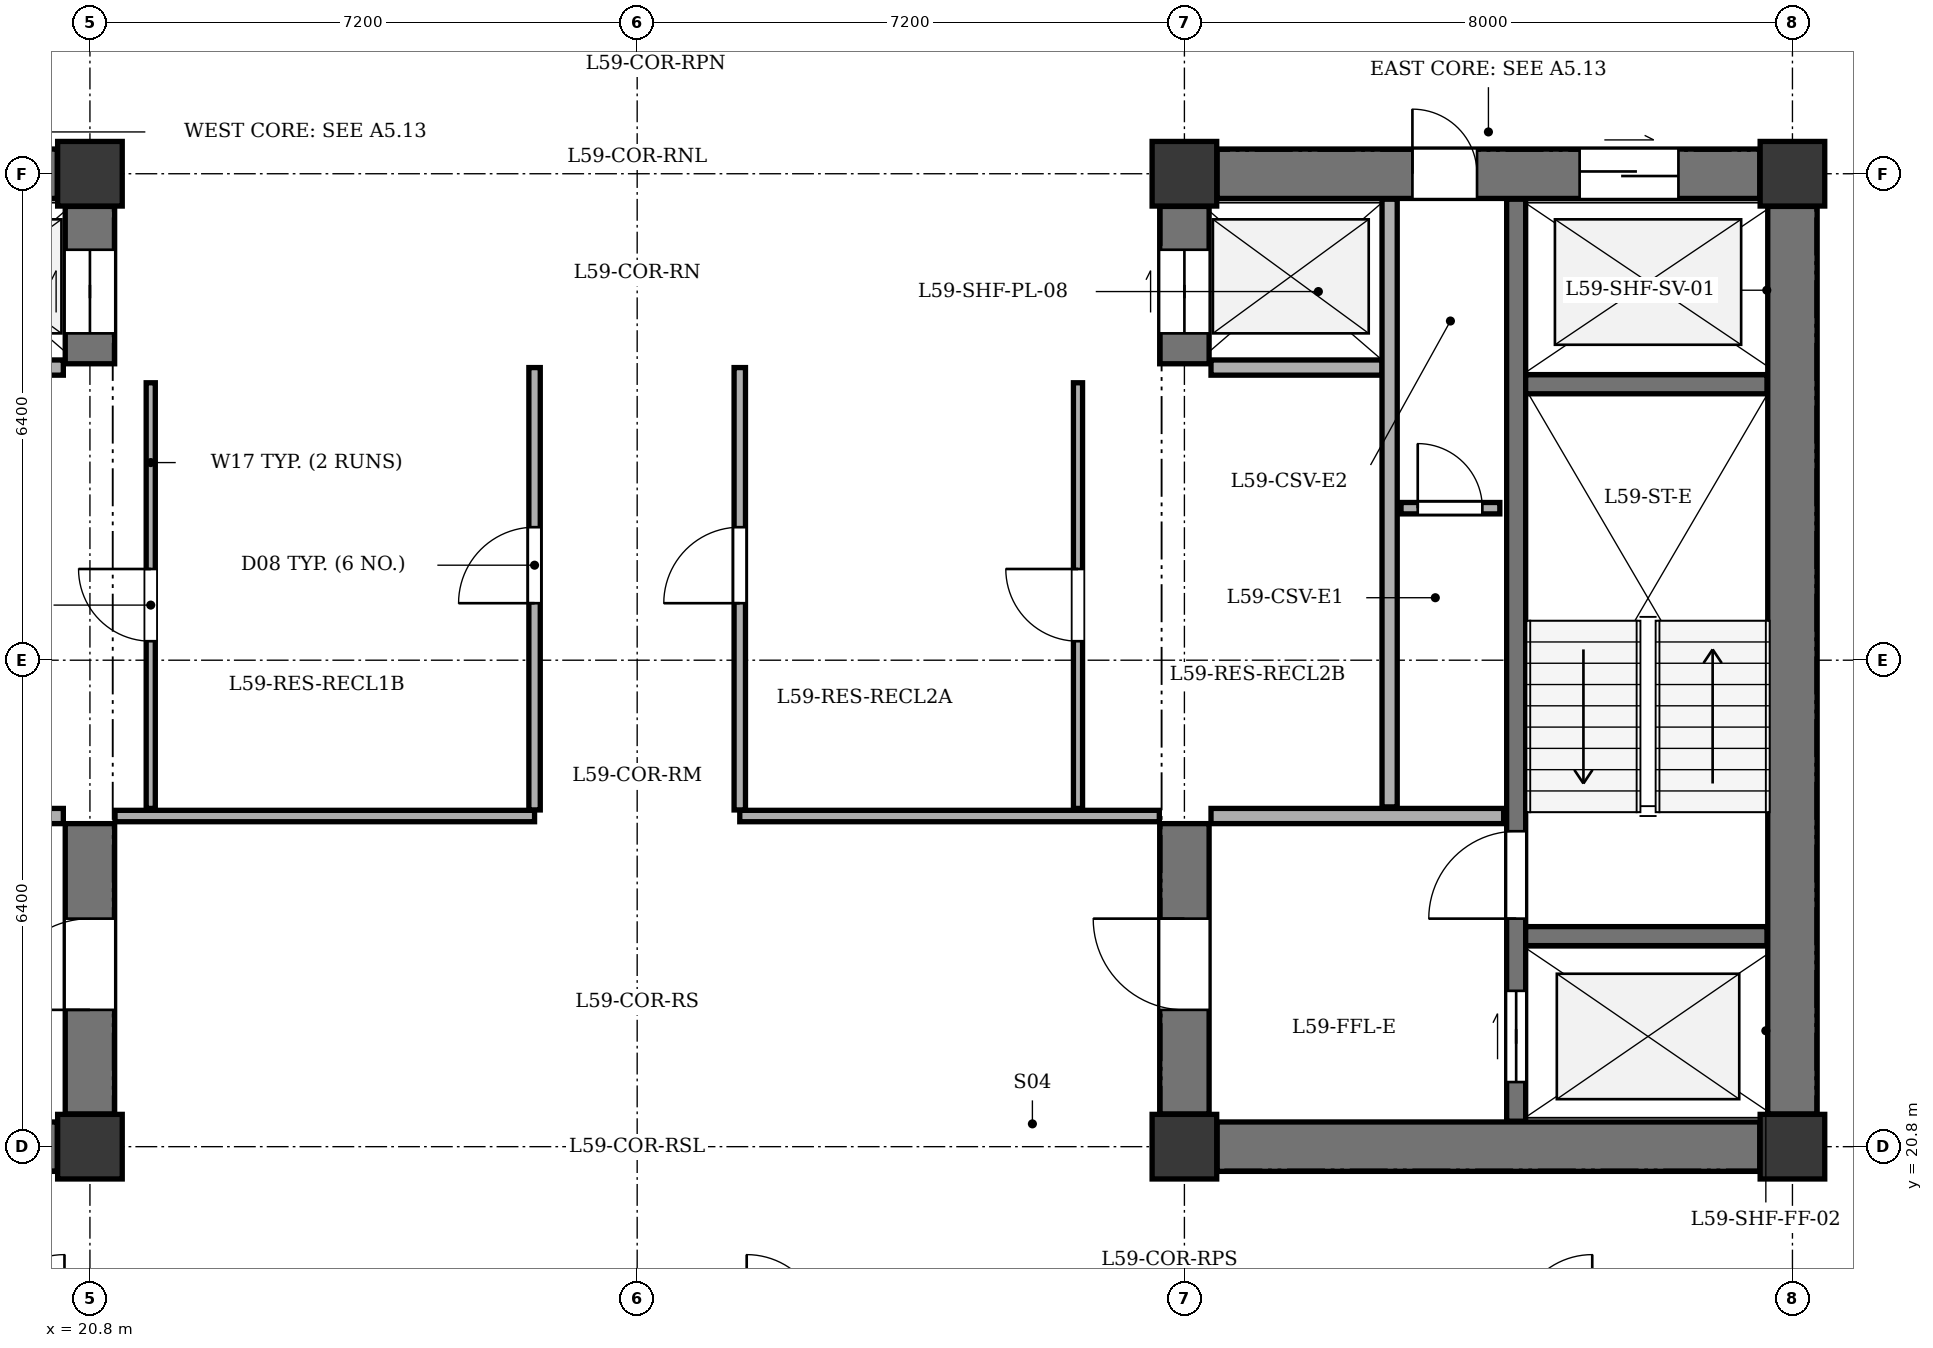
"""IFC4 building model, lengths in metres.
Left out: names, types, materials, properties, quantities, classifications, styles, units other than length and angle.
Written with IfcOpenShell. Run it as: python <this file> out.ifc"""

import sys

from ifc_helpers import new_model, si_unit, direction, frame, frame_2d, origin, origin_2d, place, context, subcontext, project, spatial, rectangle, extrude, element, fill, save


model = new_model("IFC4")
c1 = context("Model", 3, precision=1e-05, world=origin(), true_north=direction((0.0, 1.0)))
c2 = subcontext(c1, "Body", "Model", "MODEL_VIEW")
j1 = project(units=[si_unit("LENGTHUNIT", "METRE"), si_unit("PLANEANGLEUNIT", "RADIAN")], contexts=[c1])
p1 = place(None, origin())
s1 = spatial("IfcSite", under=j1, at=p1, CompositionType="ELEMENT")
p2 = place(p1, origin())
s2 = spatial("IfcBuilding", under=s1, at=p2, CompositionType="ELEMENT")
p3 = place(p2, frame((0.0, 0.0, 227.9)))
s3 = spatial("IfcBuildingStorey", under=s2, at=p3, CompositionType="ELEMENT", Elevation=227.9)
for number, where, z_axis, x_axis in (
    (1, (20.8, 20.8, 0.0), (0.0, 0.0, 1.0), (1.0, 0.0, 0.0)),
    (2, (20.8, 33.6, 0.0), (0.0, 0.0, 1.0), (1.0, 0.0, 0.0)),
    (3, (35.2, 20.8, 0.0), (0.0, 0.0, 1.0), (1.0, 0.0, 0.0)),
    (4, (43.2, 20.8, 0.0), (0.0, 0.0, 1.0), (1.0, 0.0, 0.0)),
    (5, (35.2, 33.6, 0.0), (0.0, 0.0, 1.0), (1.0, 0.0, 0.0)),
    (6, (43.2, 33.6, 0.0), (0.0, 0.0, 1.0), (1.0, 0.0, 0.0)),
):
    element("IfcColumn", number, at=place(p3, frame(where, z_axis=z_axis, x_axis=x_axis)), inside=s3, PredefinedType="COLUMN", context=c2, shape_type="SweptSolid", body=[
        extrude(rectangle(XDim=0.85, YDim=0.85, at=origin_2d()), origin(), (0.0, 0.0, 1.0), 3.4),
    ])
p4 = place(p3, frame((13.23, 20.8, 0.0), z_axis=(0.0, 0.0, 1.0), x_axis=(1.0, 0.0, 0.0)))
e7 = element("IfcWall", 7, at=p4, inside=s3, PredefinedType="SHEAR", context=c2, shape_type="SweptSolid", body=[
    extrude(rectangle(XDim=7.14, YDim=0.65, at=frame_2d((3.57, 0.0))), origin(), (0.0, 0.0, 1.0), 3.1),
])
p5 = place(p3, frame((13.23, 33.6, 0.0), z_axis=(0.0, 0.0, 1.0), x_axis=(1.0, 0.0, 0.0)))
e8 = element("IfcWall", 8, at=p5, inside=s3, PredefinedType="SHEAR", context=c2, shape_type="SweptSolid", body=[
    extrude(rectangle(XDim=7.14, YDim=0.65, at=frame_2d((3.57, 0.0))), origin(), (0.0, 0.0, 1.0), 3.1),
])
p6 = place(p5, frame((2.14, 0.0, 0.0)))
e9 = element("IfcOpeningElement", 9, at=p6, cuts=e8, PredefinedType="OPENING", context=c2, shape_type="SweptSolid", body=[
    extrude(rectangle(XDim=0.85, YDim=2.02, at=frame_2d((0.425, 1.01))), frame((0.0, 0.335, 0.0), z_axis=(0.0, -1.0, 0.0), x_axis=(1.0, 0.0, 0.0)), (0.0, 0.0, 1.0), 0.67),
])
p7 = place(p3, frame((20.8, 21.23, 0.0), z_axis=(0.0, 0.0, 1.0), x_axis=(0.0, 1.0, 0.0)))
e10 = element("IfcWall", 10, at=p7, inside=s3, PredefinedType="SHEAR", context=c2, shape_type="SweptSolid", body=[
    extrude(rectangle(XDim=3.82, YDim=0.65, at=frame_2d((1.91, 0.0))), origin(), (0.0, 0.0, 1.0), 3.1),
])
p8 = place(p7, frame((1.37, 0.0, 0.0)))
e11 = element("IfcOpeningElement", 11, at=p8, cuts=e10, PredefinedType="OPENING", context=c2, shape_type="SweptSolid", body=[
    extrude(rectangle(XDim=1.2, YDim=2.15, at=frame_2d((0.6, 1.075))), frame((0.0, 0.335, 0.0), z_axis=(0.0, -1.0, 0.0), x_axis=(1.0, 0.0, 0.0)), (0.0, 0.0, 1.0), 0.67),
])
p9 = place(p3, frame((20.8, 31.1, 0.0), z_axis=(0.0, 0.0, 1.0), x_axis=(0.0, 1.0, 0.0)))
e12 = element("IfcWall", 12, at=p9, inside=s3, PredefinedType="SHEAR", context=c2, shape_type="SweptSolid", body=[
    extrude(rectangle(XDim=2.07, YDim=0.65, at=frame_2d((1.035, 0.0))), origin(), (0.0, 0.0, 1.0), 3.1),
])
p10 = place(p9, frame((0.4, 0.0, 0.0)))
e13 = element("IfcOpeningElement", 13, at=p10, cuts=e12, PredefinedType="OPENING", context=c2, shape_type="SweptSolid", body=[
    extrude(rectangle(XDim=1.1, YDim=2.1, at=frame_2d((0.55, 1.05))), frame((0.0, 0.335, 0.0), z_axis=(0.0, -1.0, 0.0), x_axis=(1.0, 0.0, 0.0)), (0.0, 0.0, 1.0), 0.67),
])
for number, where, z_axis, x_axis in (
    (14, (16.6, 25.15, 0.0), (0.0, 0.0, 1.0), (1.0, 0.0, 0.0)),
    (15, (16.6, 31.05, 0.0), (0.0, 0.0, 1.0), (1.0, 0.0, 0.0)),
):
    element("IfcWall", number, at=place(p3, frame(where, z_axis=z_axis, x_axis=x_axis)), inside=s3, PredefinedType="SOLIDWALL", context=c2, shape_type="SweptSolid", body=[
        extrude(rectangle(XDim=3.85, YDim=0.2, at=frame_2d((1.925, 0.0))), origin(), (0.0, 0.0, 1.0), 3.1),
    ])
p11 = place(p3, frame((43.2, 21.23, 0.0), z_axis=(0.0, 0.0, 1.0), x_axis=(0.0, 1.0, 0.0)))
e16 = element("IfcWall", 16, at=p11, inside=s3, PredefinedType="SHEAR", context=c2, shape_type="SweptSolid", body=[
    extrude(rectangle(XDim=11.94, YDim=0.65, at=frame_2d((5.97, 0.0))), origin(), (0.0, 0.0, 1.0), 3.1),
])
p12 = place(p3, frame((35.63, 20.8, 0.0), z_axis=(0.0, 0.0, 1.0), x_axis=(1.0, 0.0, 0.0)))
e17 = element("IfcWall", 17, at=p12, inside=s3, PredefinedType="SHEAR", context=c2, shape_type="SweptSolid", body=[
    extrude(rectangle(XDim=7.14, YDim=0.65, at=frame_2d((3.57, 0.0))), origin(), (0.0, 0.0, 1.0), 3.1),
])
p13 = place(p3, frame((35.63, 33.6, 0.0), z_axis=(0.0, 0.0, 1.0), x_axis=(1.0, 0.0, 0.0)))
e18 = element("IfcWall", 18, at=p13, inside=s3, PredefinedType="SHEAR", context=c2, shape_type="SweptSolid", body=[
    extrude(rectangle(XDim=7.14, YDim=0.65, at=frame_2d((3.57, 0.0))), origin(), (0.0, 0.0, 1.0), 3.1),
])
p14 = place(p13, frame((4.77, 0.0, 0.0)))
e19 = element("IfcOpeningElement", 19, at=p14, cuts=e18, PredefinedType="OPENING", context=c2, shape_type="SweptSolid", body=[
    extrude(rectangle(XDim=1.3, YDim=2.15, at=frame_2d((0.65, 1.075))), frame((0.0, 0.335, 0.0), z_axis=(0.0, -1.0, 0.0), x_axis=(1.0, 0.0, 0.0)), (0.0, 0.0, 1.0), 0.67),
])
p15 = place(p13, frame((2.57, 0.0, 0.0)))
e20 = element("IfcOpeningElement", 20, at=p15, cuts=e18, PredefinedType="OPENING", context=c2, shape_type="SweptSolid", body=[
    extrude(rectangle(XDim=0.85, YDim=2.02, at=frame_2d((0.425, 1.01))), frame((0.0, 0.335, 0.0), z_axis=(0.0, -1.0, 0.0), x_axis=(1.0, 0.0, 0.0)), (0.0, 0.0, 1.0), 0.67),
])
p16 = place(p3, frame((35.2, 21.23, 0.0), z_axis=(0.0, 0.0, 1.0), x_axis=(0.0, 1.0, 0.0)))
e21 = element("IfcWall", 21, at=p16, inside=s3, PredefinedType="SHEAR", context=c2, shape_type="SweptSolid", body=[
    extrude(rectangle(XDim=3.82, YDim=0.65, at=frame_2d((1.91, 0.0))), origin(), (0.0, 0.0, 1.0), 3.1),
])
p17 = place(p16, frame((1.37, 0.0, 0.0)))
e22 = element("IfcOpeningElement", 22, at=p17, cuts=e21, PredefinedType="OPENING", context=c2, shape_type="SweptSolid", body=[
    extrude(rectangle(XDim=1.2, YDim=2.15, at=frame_2d((0.6, 1.075))), frame((0.0, 0.335, 0.0), z_axis=(0.0, -1.0, 0.0), x_axis=(1.0, 0.0, 0.0)), (0.0, 0.0, 1.0), 0.67),
])
p18 = place(p3, frame((35.2, 31.1, 0.0), z_axis=(0.0, 0.0, 1.0), x_axis=(0.0, 1.0, 0.0)))
e23 = element("IfcWall", 23, at=p18, inside=s3, PredefinedType="SHEAR", context=c2, shape_type="SweptSolid", body=[
    extrude(rectangle(XDim=2.07, YDim=0.65, at=frame_2d((1.035, 0.0))), origin(), (0.0, 0.0, 1.0), 3.1),
])
p19 = place(p18, frame((0.4, 0.0, 0.0)))
e24 = element("IfcOpeningElement", 24, at=p19, cuts=e23, PredefinedType="OPENING", context=c2, shape_type="SweptSolid", body=[
    extrude(rectangle(XDim=1.1, YDim=2.1, at=frame_2d((0.55, 1.05))), frame((0.0, 0.335, 0.0), z_axis=(0.0, -1.0, 0.0), x_axis=(1.0, 0.0, 0.0)), (0.0, 0.0, 1.0), 0.67),
])
p20 = place(p3, frame((39.565, 21.135, 0.0), z_axis=(0.0, 0.0, 1.0), x_axis=(0.0, 1.0, 0.0)))
e25 = element("IfcWall", 25, at=p20, inside=s3, PredefinedType="SHEAR", context=c2, shape_type="SweptSolid", body=[
    extrude(rectangle(XDim=12.13, YDim=0.25, at=frame_2d((6.065, 0.0))), origin(), (0.0, 0.0, 1.0), 3.1),
])
p21 = place(p20, frame((0.515, 0.0, 0.0)))
e26 = element("IfcOpeningElement", 26, at=p21, cuts=e25, PredefinedType="OPENING", context=c2, shape_type="SweptSolid", body=[
    extrude(rectangle(XDim=1.2, YDim=2.15, at=frame_2d((0.6, 1.075))), frame((0.0, 0.135, 0.0), z_axis=(0.0, -1.0, 0.0), x_axis=(1.0, 0.0, 0.0)), (0.0, 0.0, 1.0), 0.27),
])
p22 = place(p20, frame((2.665, 0.0, 0.0)))
e27 = element("IfcOpeningElement", 27, at=p22, cuts=e25, PredefinedType="OPENING", context=c2, shape_type="SweptSolid", body=[
    extrude(rectangle(XDim=1.15, YDim=2.15, at=frame_2d((0.575, 1.075))), frame((0.0, 0.135, 0.0), z_axis=(0.0, -1.0, 0.0), x_axis=(1.0, 0.0, 0.0)), (0.0, 0.0, 1.0), 0.27),
])
for number, where, z_axis, x_axis in (
    (28, (39.69, 23.57, 0.0), (0.0, 0.0, 1.0), (1.0, 0.0, 0.0)),
    (29, (39.69, 30.83, 0.0), (0.0, 0.0, 1.0), (1.0, 0.0, 0.0)),
):
    element("IfcWall", number, at=place(p3, frame(where, z_axis=z_axis, x_axis=x_axis)), inside=s3, PredefinedType="SHEAR", context=c2, shape_type="SweptSolid", body=[
        extrude(rectangle(XDim=3.175, YDim=0.25, at=frame_2d((1.587, 0.0))), origin(), (0.0, 0.0, 1.0), 3.1),
    ])
p23 = place(p3, frame((35.55, 25.15, 0.0), z_axis=(0.0, 0.0, 1.0), x_axis=(1.0, 0.0, 0.0)))
e30 = element("IfcWall", 30, at=p23, inside=s3, PredefinedType="SOLIDWALL", context=c2, shape_type="SweptSolid", body=[
    extrude(rectangle(XDim=3.85, YDim=0.2, at=frame_2d((1.925, 0.0))), origin(), (0.0, 0.0, 1.0), 3.1),
])
p24 = place(p3, frame((35.55, 31.05, 0.0), z_axis=(0.0, 0.0, 1.0), x_axis=(1.0, 0.0, 0.0)))
e31 = element("IfcWall", 31, at=p24, inside=s3, PredefinedType="SOLIDWALL", context=c2, shape_type="SweptSolid", body=[
    extrude(rectangle(XDim=2.25, YDim=0.2, at=frame_2d((1.125, 0.0))), origin(), (0.0, 0.0, 1.0), 3.1),
])
p25 = place(p3, frame((37.9, 25.27, 0.0), z_axis=(0.0, 0.0, 1.0), x_axis=(0.0, 1.0, 0.0)))
e32 = element("IfcWall", 32, at=p25, inside=s3, PredefinedType="SOLIDWALL", context=c2, shape_type="SweptSolid", body=[
    extrude(rectangle(XDim=7.995, YDim=0.2, at=frame_2d((3.998, 0.0))), origin(), (0.0, 0.0, 1.0), 3.1),
])
p26 = place(p3, frame((38.05, 29.2, 0.0), z_axis=(0.0, 0.0, 1.0), x_axis=(1.0, 0.0, 0.0)))
e33 = element("IfcWall", 33, at=p26, inside=s3, PredefinedType="PARTITIONING", context=c2, shape_type="SweptSolid", body=[
    extrude(rectangle(XDim=1.3, YDim=0.15, at=frame_2d((0.65, 0.0))), origin(), (0.0, 0.0, 1.0), 3.1),
])
p27 = place(p26, frame((0.22, 0.0, 0.0)))
e34 = element("IfcOpeningElement", 34, at=p27, cuts=e33, PredefinedType="OPENING", context=c2, shape_type="SweptSolid", body=[
    extrude(rectangle(XDim=0.85, YDim=2.02, at=frame_2d((0.425, 1.01))), frame((0.0, 0.085, 0.0), z_axis=(0.0, -1.0, 0.0), x_axis=(1.0, 0.0, 0.0)), (0.0, 0.0, 1.0), 0.17),
])
for number, where, z_axis, x_axis in (
    (35, (21.13, 25.15, 0.0), (0.0, 0.0, 1.0), (1.0, 0.0, 0.0)),
    (36, (29.35, 25.15, 0.0), (0.0, 0.0, 1.0), (1.0, 0.0, 0.0)),
):
    element("IfcWall", number, at=place(p3, frame(where, z_axis=z_axis, x_axis=x_axis)), inside=s3, PredefinedType="PARTITIONING", context=c2, shape_type="SweptSolid", body=[
        extrude(rectangle(XDim=5.52, YDim=0.15, at=frame_2d((2.76, 0.0))), origin(), (0.0, 0.0, 1.0), 3.1),
    ])
p28 = place(p3, frame((26.65, 25.23, 0.0), z_axis=(0.0, 0.0, 1.0), x_axis=(0.0, 1.0, 0.0)))
e37 = element("IfcWall", 37, at=p28, inside=s3, PredefinedType="PARTITIONING", context=c2, shape_type="SweptSolid", body=[
    extrude(rectangle(XDim=5.82, YDim=0.15, at=frame_2d((2.91, 0.0))), origin(), (0.0, 0.0, 1.0), 3.1),
])
p29 = place(p28, frame((2.72, 0.0, 0.0)))
e38 = element("IfcOpeningElement", 38, at=p29, cuts=e37, PredefinedType="OPENING", context=c2, shape_type="SweptSolid", body=[
    extrude(rectangle(XDim=1.0, YDim=2.1, at=frame_2d((0.5, 1.05))), frame((0.0, 0.085, 0.0), z_axis=(0.0, -1.0, 0.0), x_axis=(1.0, 0.0, 0.0)), (0.0, 0.0, 1.0), 0.17),
])
p30 = place(p3, frame((21.6, 25.25, 0.0), z_axis=(0.0, 0.0, 1.0), x_axis=(0.0, 1.0, 0.0)))
e39 = element("IfcWall", 39, at=p30, inside=s3, PredefinedType="PARTITIONING", context=c2, shape_type="SweptSolid", body=[
    extrude(rectangle(XDim=5.6, YDim=0.12, at=frame_2d((2.8, 0.0))), origin(), (0.0, 0.0, 1.0), 3.1),
])
p31 = place(p30, frame((2.2, 0.0, 0.0)))
e40 = element("IfcOpeningElement", 40, at=p31, cuts=e39, PredefinedType="OPENING", context=c2, shape_type="SweptSolid", body=[
    extrude(rectangle(XDim=0.95, YDim=2.1, at=frame_2d((0.475, 1.05))), frame((0.0, 0.07, 0.0), z_axis=(0.0, -1.0, 0.0), x_axis=(1.0, 0.0, 0.0)), (0.0, 0.0, 1.0), 0.14),
])
p32 = place(p3, frame((29.35, 25.23, 0.0), z_axis=(0.0, 0.0, 1.0), x_axis=(0.0, 1.0, 0.0)))
e41 = element("IfcWall", 41, at=p32, inside=s3, PredefinedType="PARTITIONING", context=c2, shape_type="SweptSolid", body=[
    extrude(rectangle(XDim=5.82, YDim=0.15, at=frame_2d((2.91, 0.0))), origin(), (0.0, 0.0, 1.0), 3.1),
])
p33 = place(p32, frame((2.72, 0.0, 0.0)))
e42 = element("IfcOpeningElement", 42, at=p33, cuts=e41, PredefinedType="OPENING", context=c2, shape_type="SweptSolid", body=[
    extrude(rectangle(XDim=1.0, YDim=2.1, at=frame_2d((0.5, 1.05))), frame((0.0, 0.085, 0.0), z_axis=(0.0, -1.0, 0.0), x_axis=(1.0, 0.0, 0.0)), (0.0, 0.0, 1.0), 0.17),
])
p34 = place(p3, frame((33.8, 25.25, 0.0), z_axis=(0.0, 0.0, 1.0), x_axis=(0.0, 1.0, 0.0)))
e43 = element("IfcWall", 43, at=p34, inside=s3, PredefinedType="PARTITIONING", context=c2, shape_type="SweptSolid", body=[
    extrude(rectangle(XDim=5.6, YDim=0.12, at=frame_2d((2.8, 0.0))), origin(), (0.0, 0.0, 1.0), 3.1),
])
p35 = place(p34, frame((2.2, 0.0, 0.0)))
e44 = element("IfcOpeningElement", 44, at=p35, cuts=e43, PredefinedType="OPENING", context=c2, shape_type="SweptSolid", body=[
    extrude(rectangle(XDim=0.95, YDim=2.1, at=frame_2d((0.475, 1.05))), frame((0.0, 0.07, 0.0), z_axis=(0.0, -1.0, 0.0), x_axis=(1.0, 0.0, 0.0)), (0.0, 0.0, 1.0), 0.14),
])
p36 = place(p8, origin())
e45 = element("IfcDoor", 45, at=p36, inside=s3, OperationType="SINGLE_SWING_LEFT", PredefinedType="DOOR", context=c2, shape_type="SweptSolid", body=[
    extrude(rectangle(XDim=1.2, YDim=2.15, at=frame_2d((0.6, 1.075))), frame((0.0, 0.025, 0.0), z_axis=(0.0, -1.0, 0.0), x_axis=(1.0, 0.0, 0.0)), (0.0, 0.0, 1.0), 0.05),
])
fill(e11, e45)
p37 = place(p10, origin())
e46 = element("IfcDoor", 46, at=p37, inside=s3, OperationType="DOUBLE_DOOR_SLIDING", PredefinedType="DOOR", context=c2, shape_type="SweptSolid", body=[
    extrude(rectangle(XDim=1.1, YDim=2.1, at=frame_2d((0.55, 1.05))), frame((0.0, 0.025, 0.0), z_axis=(0.0, -1.0, 0.0), x_axis=(1.0, 0.0, 0.0)), (0.0, 0.0, 1.0), 0.05),
])
fill(e13, e46)
p38 = place(p14, origin())
e47 = element("IfcDoor", 47, at=p38, inside=s3, OperationType="DOUBLE_DOOR_SLIDING", PredefinedType="DOOR", context=c2, shape_type="SweptSolid", body=[
    extrude(rectangle(XDim=1.3, YDim=2.15, at=frame_2d((0.65, 1.075))), frame((0.0, 0.025, 0.0), z_axis=(0.0, -1.0, 0.0), x_axis=(1.0, 0.0, 0.0)), (0.0, 0.0, 1.0), 0.05),
])
fill(e19, e47)
p39 = place(p15, origin())
e48 = element("IfcDoor", 48, at=p39, inside=s3, OperationType="SINGLE_SWING_LEFT", PredefinedType="DOOR", context=c2, shape_type="SweptSolid", body=[
    extrude(rectangle(XDim=0.85, YDim=2.02, at=frame_2d((0.425, 1.01))), frame((0.0, 0.025, 0.0), z_axis=(0.0, -1.0, 0.0), x_axis=(1.0, 0.0, 0.0)), (0.0, 0.0, 1.0), 0.05),
])
fill(e20, e48)
p40 = place(p17, origin())
e49 = element("IfcDoor", 49, at=p40, inside=s3, OperationType="SINGLE_SWING_RIGHT", PredefinedType="DOOR", context=c2, shape_type="SweptSolid", body=[
    extrude(rectangle(XDim=1.2, YDim=2.15, at=frame_2d((0.6, 1.075))), frame((0.0, 0.025, 0.0), z_axis=(0.0, -1.0, 0.0), x_axis=(1.0, 0.0, 0.0)), (0.0, 0.0, 1.0), 0.05),
])
fill(e22, e49)
p41 = place(p19, origin())
e50 = element("IfcDoor", 50, at=p41, inside=s3, OperationType="DOUBLE_DOOR_SLIDING", PredefinedType="DOOR", context=c2, shape_type="SweptSolid", body=[
    extrude(rectangle(XDim=1.1, YDim=2.1, at=frame_2d((0.55, 1.05))), frame((0.0, 0.025, 0.0), z_axis=(0.0, -1.0, 0.0), x_axis=(1.0, 0.0, 0.0)), (0.0, 0.0, 1.0), 0.05),
])
fill(e24, e50)
p42 = place(p21, origin())
e51 = element("IfcDoor", 51, at=p42, inside=s3, OperationType="DOUBLE_DOOR_SLIDING", PredefinedType="DOOR", context=c2, shape_type="SweptSolid", body=[
    extrude(rectangle(XDim=1.2, YDim=2.15, at=frame_2d((0.6, 1.075))), frame((0.0, 0.025, 0.0), z_axis=(0.0, -1.0, 0.0), x_axis=(1.0, 0.0, 0.0)), (0.0, 0.0, 1.0), 0.05),
])
fill(e26, e51)
p43 = place(p22, origin())
e52 = element("IfcDoor", 52, at=p43, inside=s3, OperationType="SINGLE_SWING_LEFT", PredefinedType="DOOR", context=c2, shape_type="SweptSolid", body=[
    extrude(rectangle(XDim=1.15, YDim=2.15, at=frame_2d((0.575, 1.075))), frame((0.0, 0.025, 0.0), z_axis=(0.0, -1.0, 0.0), x_axis=(1.0, 0.0, 0.0)), (0.0, 0.0, 1.0), 0.05),
])
fill(e27, e52)
p44 = place(p27, origin())
e53 = element("IfcDoor", 53, at=p44, inside=s3, OperationType="SINGLE_SWING_LEFT", PredefinedType="DOOR", context=c2, shape_type="SweptSolid", body=[
    extrude(rectangle(XDim=0.85, YDim=2.02, at=frame_2d((0.425, 1.01))), frame((0.0, 0.025, 0.0), z_axis=(0.0, -1.0, 0.0), x_axis=(1.0, 0.0, 0.0)), (0.0, 0.0, 1.0), 0.05),
])
fill(e34, e53)
p45 = place(p31, origin())
e54 = element("IfcDoor", 54, at=p45, inside=s3, OperationType="SINGLE_SWING_RIGHT", PredefinedType="DOOR", context=c2, shape_type="SweptSolid", body=[
    extrude(rectangle(XDim=0.95, YDim=2.1, at=frame_2d((0.475, 1.05))), frame((0.0, 0.025, 0.0), z_axis=(0.0, -1.0, 0.0), x_axis=(1.0, 0.0, 0.0)), (0.0, 0.0, 1.0), 0.05),
])
fill(e40, e54)
p46 = place(p29, origin())
e55 = element("IfcDoor", 55, at=p46, inside=s3, OperationType="SINGLE_SWING_LEFT", PredefinedType="DOOR", context=c2, shape_type="SweptSolid", body=[
    extrude(rectangle(XDim=1.0, YDim=2.1, at=frame_2d((0.5, 1.05))), frame((0.0, 0.025, 0.0), z_axis=(0.0, -1.0, 0.0), x_axis=(1.0, 0.0, 0.0)), (0.0, 0.0, 1.0), 0.05),
])
fill(e38, e55)
p47 = place(p35, origin())
e56 = element("IfcDoor", 56, at=p47, inside=s3, OperationType="SINGLE_SWING_RIGHT", PredefinedType="DOOR", context=c2, shape_type="SweptSolid", body=[
    extrude(rectangle(XDim=0.95, YDim=2.1, at=frame_2d((0.475, 1.05))), frame((0.0, 0.025, 0.0), z_axis=(0.0, -1.0, 0.0), x_axis=(1.0, 0.0, 0.0)), (0.0, 0.0, 1.0), 0.05),
])
fill(e44, e56)
p48 = place(p33, origin())
e57 = element("IfcDoor", 57, at=p48, inside=s3, OperationType="SINGLE_SWING_LEFT", PredefinedType="DOOR", context=c2, shape_type="SweptSolid", body=[
    extrude(rectangle(XDim=1.0, YDim=2.1, at=frame_2d((0.5, 1.05))), frame((0.0, 0.025, 0.0), z_axis=(0.0, -1.0, 0.0), x_axis=(1.0, 0.0, 0.0)), (0.0, 0.0, 1.0), 0.05),
])
fill(e42, e57)
save(model, sys.argv[1])
